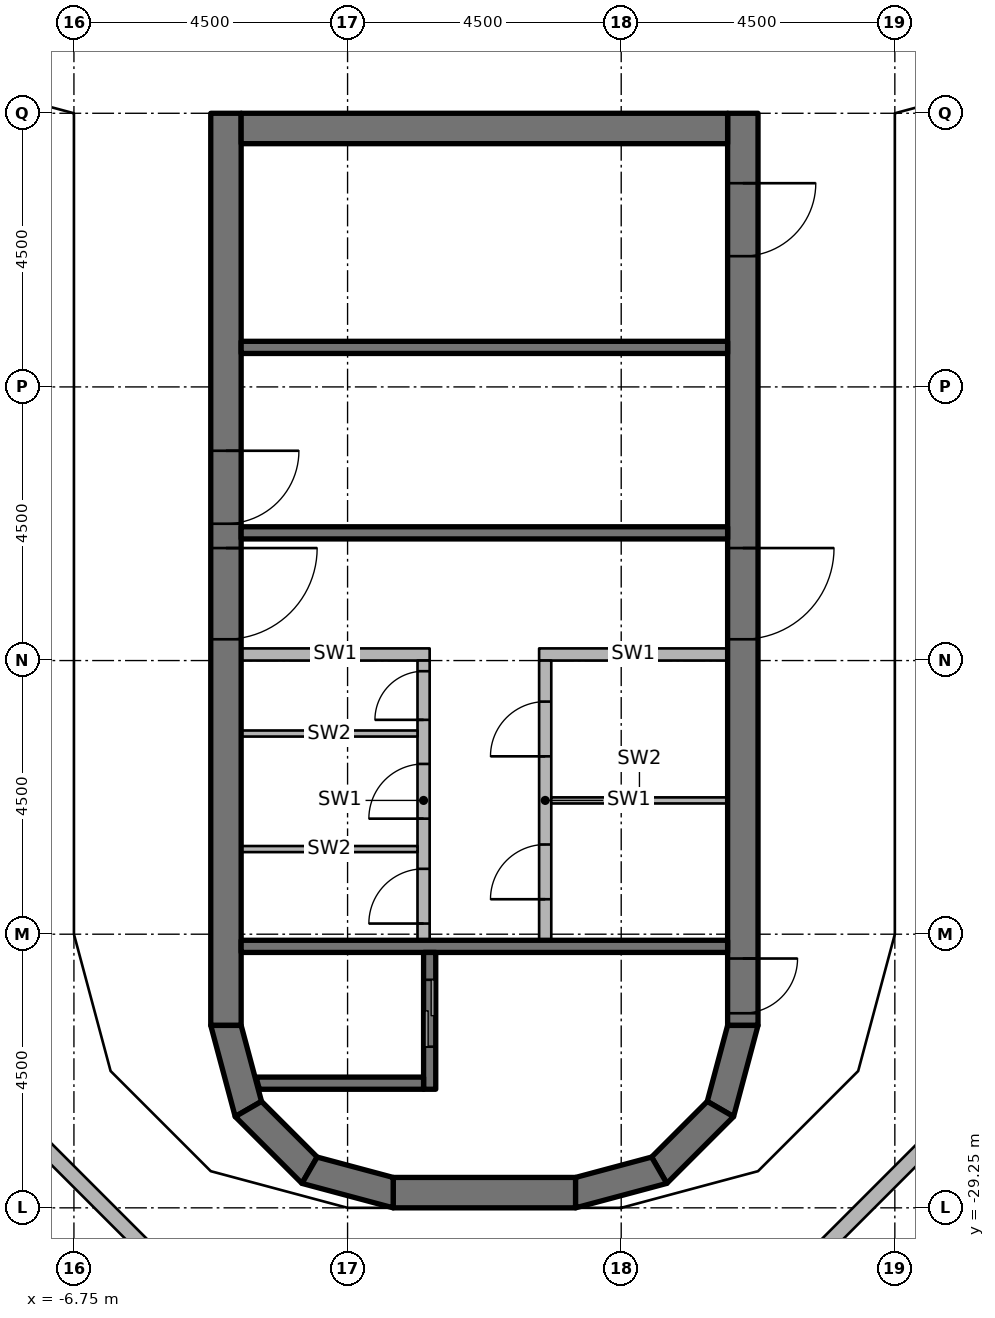
"""IFC4 building model, lengths in metres.
Left out: names, types, materials, properties, quantities, classifications, styles, units other than length and angle.
Written with IfcOpenShell. Run it as: python <this file> out.ifc"""

import sys

from ifc_helpers import new_model, si_unit, direction, frame, frame_2d, origin, origin_2d, place, context, subcontext, project, spatial, polyline, rectangle, outline, extrude, element, fill, save


model = new_model("IFC4")
c1 = context("Model", 3, precision=1e-05, world=origin(), true_north=direction((0.0, 1.0)))
c2 = subcontext(c1, "Body", "Model", "MODEL_VIEW")
j1 = project(units=[si_unit("LENGTHUNIT", "METRE"), si_unit("PLANEANGLEUNIT", "RADIAN")], contexts=[c1])
p1 = place(None, origin())
s1 = spatial("IfcSite", under=j1, at=p1, CompositionType="ELEMENT")
p2 = place(p1, origin())
s2 = spatial("IfcBuilding", under=s1, at=p2, CompositionType="ELEMENT")
p3 = place(p2, frame((0.0, 0.0, 295.2)))
s3 = spatial("IfcBuildingStorey", under=s2, at=p3, CompositionType="ELEMENT", Elevation=295.2)
for number, where, z_axis, x_axis in (
    (1, (-6.25, -24.65, 0.0), (0.0, 0.0, 1.0), (1.0, 0.0, 0.0)),
    (2, (-6.25, -20.25, 0.0), (0.0, 0.0, 1.0), (1.0, 0.0, 0.0)),
    (3, (-6.25, -15.75, 0.0), (0.0, 0.0, 1.0), (1.0, 0.0, 0.0)),
    (4, (-6.25, -10.75, 0.0), (0.0, 0.0, 1.0), (1.0, 0.0, 0.0)),
    (5, (6.25, -24.65, 0.0), (0.0, 0.0, 1.0), (1.0, 0.0, 0.0)),
    (6, (6.25, -20.25, 0.0), (0.0, 0.0, 1.0), (1.0, 0.0, 0.0)),
    (7, (6.25, -15.75, 0.0), (0.0, 0.0, 1.0), (1.0, 0.0, 0.0)),
    (8, (6.25, -10.75, 0.0), (0.0, 0.0, 1.0), (1.0, 0.0, 0.0)),
):
    element("IfcColumn", number, at=place(p3, frame(where, z_axis=z_axis, x_axis=x_axis)), inside=s3, PredefinedType="COLUMN", context=c2, shape_type="SweptSolid", body=[
        extrude(rectangle(XDim=0.6, YDim=0.6, at=origin_2d()), origin(), (0.0, 0.0, 1.0), 3.45),
    ])
p4 = place(p3, frame((-4.25, -11.25, 0.0), z_axis=(0.0, 0.0, 1.0), x_axis=(0.0, -1.0, 0.0)))
e9 = element("IfcWall", 9, at=p4, inside=s3, PredefinedType="SHEAR", context=c2, shape_type="SweptSolid", body=[
    extrude(rectangle(XDim=15.0, YDim=0.5, at=frame_2d((7.5, 0.0))), origin(), (0.0, 0.0, 1.0), 3.6),
])
p5 = place(p4, frame((7.15, 0.0, 0.0)))
e10 = element("IfcOpeningElement", 10, at=p5, cuts=e9, PredefinedType="OPENING", context=c2, shape_type="SweptSolid", body=[
    extrude(rectangle(XDim=1.5, YDim=2.3, at=frame_2d((0.75, 1.15))), frame((0.0, 0.26, 0.0), z_axis=(0.0, -1.0, 0.0), x_axis=(1.0, 0.0, 0.0)), (0.0, 0.0, 1.0), 0.52),
])
p6 = place(p4, frame((5.55, 0.0, 0.0)))
e11 = element("IfcOpeningElement", 11, at=p6, cuts=e9, PredefinedType="OPENING", context=c2, shape_type="SweptSolid", body=[
    extrude(rectangle(XDim=1.2, YDim=2.1, at=frame_2d((0.6, 1.05))), frame((0.0, 0.26, 0.0), z_axis=(0.0, -1.0, 0.0), x_axis=(1.0, 0.0, 0.0)), (0.0, 0.0, 1.0), 0.52),
])
p7 = place(p3, frame((4.25, -11.25, 0.0), z_axis=(0.0, 0.0, 1.0), x_axis=(0.0, -1.0, 0.0)))
e12 = element("IfcWall", 12, at=p7, inside=s3, PredefinedType="SHEAR", context=c2, shape_type="SweptSolid", body=[
    extrude(rectangle(XDim=15.0, YDim=0.5, at=frame_2d((7.5, 0.0))), origin(), (0.0, 0.0, 1.0), 3.6),
])
p8 = place(p7, frame((7.15, 0.0, 0.0)))
e13 = element("IfcOpeningElement", 13, at=p8, cuts=e12, PredefinedType="OPENING", context=c2, shape_type="SweptSolid", body=[
    extrude(rectangle(XDim=1.5, YDim=2.3, at=frame_2d((0.75, 1.15))), frame((0.0, 0.26, 0.0), z_axis=(0.0, -1.0, 0.0), x_axis=(1.0, 0.0, 0.0)), (0.0, 0.0, 1.0), 0.52),
])
p9 = place(p7, frame((13.9, 0.0, 0.0)))
e14 = element("IfcOpeningElement", 14, at=p9, cuts=e12, PredefinedType="OPENING", context=c2, shape_type="SweptSolid", body=[
    extrude(rectangle(XDim=0.9, YDim=2.1, at=frame_2d((0.45, 1.05))), frame((0.0, 0.26, 0.0), z_axis=(0.0, -1.0, 0.0), x_axis=(1.0, 0.0, 0.0)), (0.0, 0.0, 1.0), 0.52),
])
p10 = place(p7, frame((1.15, 0.0, 0.0)))
e15 = element("IfcOpeningElement", 15, at=p10, cuts=e12, PredefinedType="OPENING", context=c2, shape_type="SweptSolid", body=[
    extrude(rectangle(XDim=1.2, YDim=2.1, at=frame_2d((0.6, 1.05))), frame((0.0, 0.26, 0.0), z_axis=(0.0, -1.0, 0.0), x_axis=(1.0, 0.0, 0.0)), (0.0, 0.0, 1.0), 0.52),
])
p11 = place(p3, frame((-4.0, -11.5, 0.0), z_axis=(0.0, 0.0, 1.0), x_axis=(1.0, 0.0, 0.0)))
e16 = element("IfcWall", 16, at=p11, inside=s3, PredefinedType="SHEAR", context=c2, shape_type="SweptSolid", body=[
    extrude(rectangle(XDim=8.0, YDim=0.5, at=frame_2d((4.0, 0.0))), origin(), (0.0, 0.0, 1.0), 3.6),
])
p12 = place(p3, frame((-1.5, -29.0, 0.0), z_axis=(0.0, 0.0, 1.0), x_axis=(1.0, 0.0, 0.0)))
e17 = element("IfcWall", 17, at=p12, inside=s3, PredefinedType="SHEAR", context=c2, shape_type="SweptSolid", body=[
    extrude(rectangle(XDim=3.0, YDim=0.5, at=frame_2d((1.5, 0.0))), origin(), (0.0, 0.0, 1.0), 3.6),
])
p13 = place(p3, origin())
e18 = element("IfcWall", 18, at=p13, inside=s3, PredefinedType="SHEAR", context=c2, shape_type="SweptSolid", body=[
    extrude(outline(polyline([(-4.5, -26.25), (-4.098, -27.75), (-3.665, -27.5), (-4.0, -26.25), (-4.5, -26.25)])), origin(), (0.0, 0.0, 1.0), 3.6),
])
p14 = place(p3, origin())
e19 = element("IfcWall", 19, at=p14, inside=s3, PredefinedType="SHEAR", context=c2, shape_type="SweptSolid", body=[
    extrude(outline(polyline([(-4.098, -27.75), (-3.0, -28.848), (-2.75, -28.415), (-3.665, -27.5), (-4.098, -27.75)])), origin(), (0.0, 0.0, 1.0), 3.6),
])
p15 = place(p3, origin())
e20 = element("IfcWall", 20, at=p15, inside=s3, PredefinedType="SHEAR", context=c2, shape_type="SweptSolid", body=[
    extrude(outline(polyline([(-3.0, -28.848), (-1.5, -29.25), (-1.5, -28.75), (-2.75, -28.415), (-3.0, -28.848)])), origin(), (0.0, 0.0, 1.0), 3.6),
])
p16 = place(p3, origin())
e21 = element("IfcWall", 21, at=p16, inside=s3, PredefinedType="SHEAR", context=c2, shape_type="SweptSolid", body=[
    extrude(outline(polyline([(4.5, -26.25), (4.098, -27.75), (3.665, -27.5), (4.0, -26.25), (4.5, -26.25)])), origin(), (0.0, 0.0, 1.0), 3.6),
])
p17 = place(p3, origin())
e22 = element("IfcWall", 22, at=p17, inside=s3, PredefinedType="SHEAR", context=c2, shape_type="SweptSolid", body=[
    extrude(outline(polyline([(4.098, -27.75), (3.0, -28.848), (2.75, -28.415), (3.665, -27.5), (4.098, -27.75)])), origin(), (0.0, 0.0, 1.0), 3.6),
])
p18 = place(p3, origin())
e23 = element("IfcWall", 23, at=p18, inside=s3, PredefinedType="SHEAR", context=c2, shape_type="SweptSolid", body=[
    extrude(outline(polyline([(3.0, -28.848), (1.5, -29.25), (1.5, -28.75), (2.75, -28.415), (3.0, -28.848)])), origin(), (0.0, 0.0, 1.0), 3.6),
])
p19 = place(p3, origin())
e24 = element("IfcWall", 24, at=p19, inside=s3, PredefinedType="PARAPET", context=c2, shape_type="SweptSolid", body=[
    extrude(outline(polyline([(-5.421, -30.243), (-7.743, -27.921), (-7.519, -27.792), (-5.292, -30.019), (-5.421, -30.243)])), origin(), (0.0, 0.0, 1.0), 1.22),
])
p20 = place(p3, origin())
e25 = element("IfcWall", 25, at=p20, inside=s3, PredefinedType="PARAPET", context=c2, shape_type="SweptSolid", body=[
    extrude(outline(polyline([(7.743, -27.921), (5.421, -30.243), (5.292, -30.019), (7.519, -27.792), (7.743, -27.921)])), origin(), (0.0, 0.0, 1.0), 1.22),
])
p21 = place(p3, frame((4.0, -24.95, 0.0), z_axis=(0.0, 0.0, 1.0), x_axis=(-1.0, 0.0, 0.0)))
e26 = element("IfcWall", 26, at=p21, inside=s3, PredefinedType="SHEAR", context=c2, shape_type="SweptSolid", body=[
    extrude(rectangle(XDim=8.0, YDim=0.2, at=frame_2d((4.0, 0.0))), origin(), (0.0, 0.0, 1.0), 3.45),
])
p22 = place(p3, frame((-0.9, -27.3, 0.0), z_axis=(0.0, 0.0, 1.0), x_axis=(0.0, 1.0, 0.0)))
e27 = element("IfcWall", 27, at=p22, inside=s3, PredefinedType="SHEAR", context=c2, shape_type="SweptSolid", body=[
    extrude(rectangle(XDim=2.25, YDim=0.2, at=frame_2d((1.125, 0.0))), origin(), (0.0, 0.0, 1.0), 3.45),
])
p23 = place(p22, frame((0.7, 0.0, 0.0)))
e28 = element("IfcOpeningElement", 28, at=p23, cuts=e27, PredefinedType="OPENING", context=c2, shape_type="SweptSolid", body=[
    extrude(rectangle(XDim=1.1, YDim=2.3, at=frame_2d((0.55, 1.15))), frame((0.0, 0.11, 0.0), z_axis=(0.0, -1.0, 0.0), x_axis=(1.0, 0.0, 0.0)), (0.0, 0.0, 1.0), 0.22),
])
p24 = place(p3, origin())
e29 = element("IfcWall", 29, at=p24, inside=s3, PredefinedType="SHEAR", context=c2, shape_type="SweptSolid", body=[
    extrude(outline(polyline([(-1.0, -27.1), (-3.755, -27.1), (-3.701, -27.3), (-1.0, -27.3), (-1.0, -27.1)])), origin(), (0.0, 0.0, 1.0), 3.45),
])
for number, where, z_axis, x_axis in (
    (30, (4.0, -18.15, 0.0), (0.0, 0.0, 1.0), (-1.0, 0.0, 0.0)),
    (31, (4.0, -15.1, 0.0), (0.0, 0.0, 1.0), (-1.0, 0.0, 0.0)),
):
    element("IfcWall", number, at=place(p3, frame(where, z_axis=z_axis, x_axis=x_axis)), inside=s3, PredefinedType="SHEAR", context=c2, shape_type="SweptSolid", body=[
        extrude(rectangle(XDim=8.0, YDim=0.2, at=frame_2d((4.0, 0.0))), origin(), (0.0, 0.0, 1.0), 3.45),
    ])
p25 = place(p3, frame((4.0, -20.15, 0.0), z_axis=(0.0, 0.0, 1.0), x_axis=(-1.0, 0.0, 0.0)))
e32 = element("IfcWall", 32, at=p25, inside=s3, PredefinedType="PARTITIONING", context=c2, shape_type="SweptSolid", body=[
    extrude(rectangle(XDim=3.1, YDim=0.2, at=frame_2d((1.55, 0.0))), origin(), (0.0, 0.0, 1.0), 3.45),
])
p26 = place(p3, frame((1.0, -24.85, 0.0), z_axis=(0.0, 0.0, 1.0), x_axis=(0.0, 1.0, 0.0)))
e33 = element("IfcWall", 33, at=p26, inside=s3, PredefinedType="PARTITIONING", context=c2, shape_type="SweptSolid", body=[
    extrude(rectangle(XDim=4.6, YDim=0.2, at=frame_2d((2.3, 0.0))), origin(), (0.0, 0.0, 1.0), 3.45),
])
p27 = place(p26, frame((0.675, 0.0, 0.0)))
e34 = element("IfcOpeningElement", 34, at=p27, cuts=e33, PredefinedType="OPENING", context=c2, shape_type="SweptSolid", body=[
    extrude(rectangle(XDim=0.9, YDim=2.1, at=frame_2d((0.45, 1.05))), frame((0.0, 0.11, 0.0), z_axis=(0.0, -1.0, 0.0), x_axis=(1.0, 0.0, 0.0)), (0.0, 0.0, 1.0), 0.22),
])
p28 = place(p26, frame((3.025, 0.0, 0.0)))
e35 = element("IfcOpeningElement", 35, at=p28, cuts=e33, PredefinedType="OPENING", context=c2, shape_type="SweptSolid", body=[
    extrude(rectangle(XDim=0.9, YDim=2.1, at=frame_2d((0.45, 1.05))), frame((0.0, 0.11, 0.0), z_axis=(0.0, -1.0, 0.0), x_axis=(1.0, 0.0, 0.0)), (0.0, 0.0, 1.0), 0.22),
])
p29 = place(p3, frame((-0.9, -20.15, 0.0), z_axis=(0.0, 0.0, 1.0), x_axis=(-1.0, 0.0, 0.0)))
e36 = element("IfcWall", 36, at=p29, inside=s3, PredefinedType="PARTITIONING", context=c2, shape_type="SweptSolid", body=[
    extrude(rectangle(XDim=3.1, YDim=0.2, at=frame_2d((1.55, 0.0))), origin(), (0.0, 0.0, 1.0), 3.45),
])
p30 = place(p3, frame((-1.0, -24.85, 0.0), z_axis=(0.0, 0.0, 1.0), x_axis=(0.0, 1.0, 0.0)))
e37 = element("IfcWall", 37, at=p30, inside=s3, PredefinedType="PARTITIONING", context=c2, shape_type="SweptSolid", body=[
    extrude(rectangle(XDim=4.6, YDim=0.2, at=frame_2d((2.3, 0.0))), origin(), (0.0, 0.0, 1.0), 3.45),
])
p31 = place(p30, frame((0.275, 0.0, 0.0)))
e38 = element("IfcOpeningElement", 38, at=p31, cuts=e37, PredefinedType="OPENING", context=c2, shape_type="SweptSolid", body=[
    extrude(rectangle(XDim=0.9, YDim=2.1, at=frame_2d((0.45, 1.05))), frame((0.0, 0.11, 0.0), z_axis=(0.0, -1.0, 0.0), x_axis=(1.0, 0.0, 0.0)), (0.0, 0.0, 1.0), 0.22),
])
p32 = place(p30, frame((2.0, 0.0, 0.0)))
e39 = element("IfcOpeningElement", 39, at=p32, cuts=e37, PredefinedType="OPENING", context=c2, shape_type="SweptSolid", body=[
    extrude(rectangle(XDim=0.9, YDim=2.1, at=frame_2d((0.45, 1.05))), frame((0.0, 0.11, 0.0), z_axis=(0.0, -1.0, 0.0), x_axis=(1.0, 0.0, 0.0)), (0.0, 0.0, 1.0), 0.22),
])
p33 = place(p30, frame((3.625, 0.0, 0.0)))
e40 = element("IfcOpeningElement", 40, at=p33, cuts=e37, PredefinedType="OPENING", context=c2, shape_type="SweptSolid", body=[
    extrude(rectangle(XDim=0.8, YDim=2.1, at=frame_2d((0.4, 1.05))), frame((0.0, 0.11, 0.0), z_axis=(0.0, -1.0, 0.0), x_axis=(1.0, 0.0, 0.0)), (0.0, 0.0, 1.0), 0.22),
])
for number, where, z_axis, x_axis in (
    (41, (4.0, -22.55, 0.0), (0.0, 0.0, 1.0), (-1.0, 0.0, 0.0)),
    (42, (-1.1, -23.35, 0.0), (0.0, 0.0, 1.0), (-1.0, 0.0, 0.0)),
    (43, (-1.1, -21.45, 0.0), (0.0, 0.0, 1.0), (-1.0, 0.0, 0.0)),
):
    element("IfcWall", number, at=place(p3, frame(where, z_axis=z_axis, x_axis=x_axis)), inside=s3, PredefinedType="PARTITIONING", context=c2, shape_type="SweptSolid", body=[
        extrude(rectangle(XDim=2.9, YDim=0.1, at=frame_2d((1.45, 0.0))), origin(), (0.0, 0.0, 1.0), 3.45),
    ])
p34 = place(p8, origin())
e44 = element("IfcDoor", 44, at=p34, inside=s3, OperationType="DOUBLE_DOOR_SINGLE_SWING", PredefinedType="DOOR", context=c2, shape_type="SweptSolid", body=[
    extrude(rectangle(XDim=1.5, YDim=2.3, at=frame_2d((0.75, 1.15))), frame((0.0, 0.025, 0.0), z_axis=(0.0, -1.0, 0.0), x_axis=(1.0, 0.0, 0.0)), (0.0, 0.0, 1.0), 0.05),
])
fill(e13, e44)
p35 = place(p5, origin())
e45 = element("IfcDoor", 45, at=p35, inside=s3, OperationType="DOUBLE_DOOR_SINGLE_SWING", PredefinedType="DOOR", context=c2, shape_type="SweptSolid", body=[
    extrude(rectangle(XDim=1.5, YDim=2.3, at=frame_2d((0.75, 1.15))), frame((0.0, 0.025, 0.0), z_axis=(0.0, -1.0, 0.0), x_axis=(1.0, 0.0, 0.0)), (0.0, 0.0, 1.0), 0.05),
])
fill(e10, e45)
p36 = place(p9, origin())
e46 = element("IfcDoor", 46, at=p36, inside=s3, OperationType="SINGLE_SWING_RIGHT", PredefinedType="DOOR", context=c2, shape_type="SweptSolid", body=[
    extrude(rectangle(XDim=0.9, YDim=2.1, at=frame_2d((0.45, 1.05))), frame((0.0, 0.025, 0.0), z_axis=(0.0, -1.0, 0.0), x_axis=(1.0, 0.0, 0.0)), (0.0, 0.0, 1.0), 0.05),
])
fill(e14, e46)
p37 = place(p6, origin())
e47 = element("IfcDoor", 47, at=p37, inside=s3, OperationType="SINGLE_SWING_RIGHT", PredefinedType="DOOR", context=c2, shape_type="SweptSolid", body=[
    extrude(rectangle(XDim=1.2, YDim=2.1, at=frame_2d((0.6, 1.05))), frame((0.0, 0.025, 0.0), z_axis=(0.0, -1.0, 0.0), x_axis=(1.0, 0.0, 0.0)), (0.0, 0.0, 1.0), 0.05),
])
fill(e11, e47)
p38 = place(p10, origin())
e48 = element("IfcDoor", 48, at=p38, inside=s3, OperationType="SINGLE_SWING_RIGHT", PredefinedType="DOOR", context=c2, shape_type="SweptSolid", body=[
    extrude(rectangle(XDim=1.2, YDim=2.1, at=frame_2d((0.6, 1.05))), frame((0.0, 0.025, 0.0), z_axis=(0.0, -1.0, 0.0), x_axis=(1.0, 0.0, 0.0)), (0.0, 0.0, 1.0), 0.05),
])
fill(e15, e48)
p39 = place(p23, origin())
e49 = element("IfcDoor", 49, at=p39, inside=s3, OperationType="DOUBLE_DOOR_SLIDING", PredefinedType="DOOR", context=c2, shape_type="SweptSolid", body=[
    extrude(rectangle(XDim=1.1, YDim=2.3, at=frame_2d((0.55, 1.15))), frame((0.0, 0.025, 0.0), z_axis=(0.0, -1.0, 0.0), x_axis=(1.0, 0.0, 0.0)), (0.0, 0.0, 1.0), 0.05),
])
fill(e28, e49)
p40 = place(p27, origin())
e50 = element("IfcDoor", 50, at=p40, inside=s3, OperationType="SINGLE_SWING_LEFT", PredefinedType="DOOR", context=c2, shape_type="SweptSolid", body=[
    extrude(rectangle(XDim=0.9, YDim=2.1, at=frame_2d((0.45, 1.05))), frame((0.0, 0.025, 0.0), z_axis=(0.0, -1.0, 0.0), x_axis=(1.0, 0.0, 0.0)), (0.0, 0.0, 1.0), 0.05),
])
fill(e34, e50)
p41 = place(p28, origin())
e51 = element("IfcDoor", 51, at=p41, inside=s3, OperationType="SINGLE_SWING_RIGHT", PredefinedType="DOOR", context=c2, shape_type="SweptSolid", body=[
    extrude(rectangle(XDim=0.9, YDim=2.1, at=frame_2d((0.45, 1.05))), frame((0.0, 0.025, 0.0), z_axis=(0.0, -1.0, 0.0), x_axis=(1.0, 0.0, 0.0)), (0.0, 0.0, 1.0), 0.05),
])
fill(e35, e51)
p42 = place(p31, origin())
e52 = element("IfcDoor", 52, at=p42, inside=s3, OperationType="SINGLE_SWING_RIGHT", PredefinedType="DOOR", context=c2, shape_type="SweptSolid", body=[
    extrude(rectangle(XDim=0.9, YDim=2.1, at=frame_2d((0.45, 1.05))), frame((0.0, 0.025, 0.0), z_axis=(0.0, -1.0, 0.0), x_axis=(1.0, 0.0, 0.0)), (0.0, 0.0, 1.0), 0.05),
])
fill(e38, e52)
p43 = place(p32, origin())
e53 = element("IfcDoor", 53, at=p43, inside=s3, OperationType="SINGLE_SWING_LEFT", PredefinedType="DOOR", context=c2, shape_type="SweptSolid", body=[
    extrude(rectangle(XDim=0.9, YDim=2.1, at=frame_2d((0.45, 1.05))), frame((0.0, 0.025, 0.0), z_axis=(0.0, -1.0, 0.0), x_axis=(1.0, 0.0, 0.0)), (0.0, 0.0, 1.0), 0.05),
])
fill(e39, e53)
p44 = place(p33, origin())
e54 = element("IfcDoor", 54, at=p44, inside=s3, OperationType="SINGLE_SWING_RIGHT", PredefinedType="DOOR", context=c2, shape_type="SweptSolid", body=[
    extrude(rectangle(XDim=0.8, YDim=2.1, at=frame_2d((0.4, 1.05))), frame((0.0, 0.025, 0.0), z_axis=(0.0, -1.0, 0.0), x_axis=(1.0, 0.0, 0.0)), (0.0, 0.0, 1.0), 0.05),
])
fill(e40, e54)
save(model, sys.argv[1])
